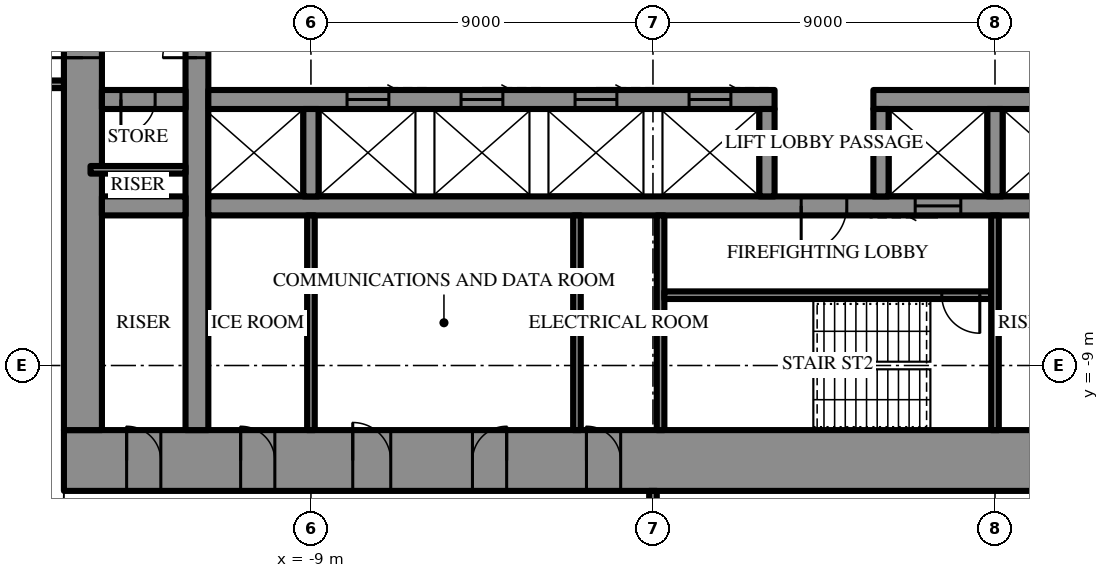
"""IFC4 building model, lengths in metres.
Left out: names, types, materials, properties, quantities, classifications, styles, units other than length and angle.
Written with IfcOpenShell. Run it as: python <this file> out.ifc"""

import sys

from ifc_helpers import new_model, si_unit, direction, frame, frame_2d, origin, place, context, subcontext, project, spatial, rectangle, extrude, element, fill, save


model = new_model("IFC4")
c1 = context("Model", 3, precision=1e-05, world=origin(), true_north=direction((0.0, 1.0)))
c2 = subcontext(c1, "Body", "Model", "MODEL_VIEW")
j1 = project(units=[si_unit("LENGTHUNIT", "METRE"), si_unit("PLANEANGLEUNIT", "RADIAN")], contexts=[c1])
p1 = place(None, origin())
s1 = spatial("IfcSite", under=j1, at=p1, CompositionType="ELEMENT")
p2 = place(p1, origin())
s2 = spatial("IfcBuilding", under=s1, at=p2, CompositionType="ELEMENT")
p3 = place(p2, frame((0.0, 0.0, 270.1)))
s3 = spatial("IfcBuildingStorey", under=s2, at=p3, CompositionType="ELEMENT", Elevation=270.1)
p4 = place(p3, frame((15.5, -11.5, 0.0), z_axis=(0.0, 0.0, 1.0), x_axis=(-1.0, 0.0, 0.0)))
e1 = element("IfcWall", 1, at=p4, inside=s3, PredefinedType="SHEAR", context=c2, shape_type="SweptSolid", body=[
    extrude(rectangle(XDim=31.0, YDim=1.6, at=frame_2d((15.5, 0.0))), origin(), (0.0, 0.0, 1.0), 4.2),
])
p5 = place(p4, frame((16.35, 0.0, 0.0)))
e2 = element("IfcOpeningElement", 2, at=p5, cuts=e1, PredefinedType="OPENING", context=c2, shape_type="SweptSolid", body=[
    extrude(rectangle(XDim=0.9, YDim=2.2, at=frame_2d((0.45, 1.1))), frame((0.0, 0.81, 0.0), z_axis=(0.0, -1.0, 0.0), x_axis=(1.0, 0.0, 0.0)), (0.0, 0.0, 1.0), 1.62),
])
p6 = place(p4, frame((19.35, 0.0, 0.0)))
e3 = element("IfcOpeningElement", 3, at=p6, cuts=e1, PredefinedType="OPENING", context=c2, shape_type="SweptSolid", body=[
    extrude(rectangle(XDim=0.9, YDim=2.2, at=frame_2d((0.45, 1.1))), frame((0.0, 0.81, 0.0), z_axis=(0.0, -1.0, 0.0), x_axis=(1.0, 0.0, 0.0)), (0.0, 0.0, 1.0), 1.62),
])
p7 = place(p4, frame((22.4, 0.0, 0.0)))
e4 = element("IfcOpeningElement", 4, at=p7, cuts=e1, PredefinedType="OPENING", context=c2, shape_type="SweptSolid", body=[
    extrude(rectangle(XDim=1.0, YDim=2.2, at=frame_2d((0.5, 1.1))), frame((0.0, 0.81, 0.0), z_axis=(0.0, -1.0, 0.0), x_axis=(1.0, 0.0, 0.0)), (0.0, 0.0, 1.0), 1.62),
])
p8 = place(p4, frame((1.65, 0.0, 0.0)))
e5 = element("IfcOpeningElement", 5, at=p8, cuts=e1, PredefinedType="OPENING", context=c2, shape_type="SweptSolid", body=[
    extrude(rectangle(XDim=0.9, YDim=2.2, at=frame_2d((0.45, 1.1))), frame((0.0, 0.81, 0.0), z_axis=(0.0, -1.0, 0.0), x_axis=(1.0, 0.0, 0.0)), (0.0, 0.0, 1.0), 1.62),
])
p9 = place(p4, frame((4.65, 0.0, 0.0)))
e6 = element("IfcOpeningElement", 6, at=p9, cuts=e1, PredefinedType="OPENING", context=c2, shape_type="SweptSolid", body=[
    extrude(rectangle(XDim=0.9, YDim=2.2, at=frame_2d((0.45, 1.1))), frame((0.0, 0.81, 0.0), z_axis=(0.0, -1.0, 0.0), x_axis=(1.0, 0.0, 0.0)), (0.0, 0.0, 1.0), 1.62),
])
p10 = place(p4, frame((25.45, 0.0, 0.0)))
e7 = element("IfcOpeningElement", 7, at=p10, cuts=e1, PredefinedType="OPENING", context=c2, shape_type="SweptSolid", body=[
    extrude(rectangle(XDim=0.9, YDim=2.2, at=frame_2d((0.45, 1.1))), frame((0.0, 0.81, 0.0), z_axis=(0.0, -1.0, 0.0), x_axis=(1.0, 0.0, 0.0)), (0.0, 0.0, 1.0), 1.62),
])
p11 = place(p4, frame((28.45, 0.0, 0.0)))
e8 = element("IfcOpeningElement", 8, at=p11, cuts=e1, PredefinedType="OPENING", context=c2, shape_type="SweptSolid", body=[
    extrude(rectangle(XDim=0.9, YDim=2.2, at=frame_2d((0.45, 1.1))), frame((0.0, 0.81, 0.0), z_axis=(0.0, -1.0, 0.0), x_axis=(1.0, 0.0, 0.0)), (0.0, 0.0, 1.0), 1.62),
])
p12 = place(p3, frame((-15.0, 10.7, 0.0), z_axis=(0.0, 0.0, 1.0), x_axis=(0.0, -1.0, 0.0)))
e9 = element("IfcWall", 9, at=p12, inside=s3, PredefinedType="SHEAR", context=c2, shape_type="SweptSolid", body=[
    extrude(rectangle(XDim=21.4, YDim=1.0, at=frame_2d((10.7, 0.0))), origin(), (0.0, 0.0, 1.0), 4.2),
])
p13 = place(p12, frame((9.8, 0.0, 0.0)))
e10 = element("IfcOpeningElement", 10, at=p13, cuts=e9, PredefinedType="OPENING", context=c2, shape_type="SweptSolid", body=[
    extrude(rectangle(XDim=1.8, YDim=2.4, at=frame_2d((0.9, 1.2))), frame((0.0, 0.51, 0.0), z_axis=(0.0, -1.0, 0.0), x_axis=(1.0, 0.0, 0.0)), (0.0, 0.0, 1.0), 1.02),
])
p14 = place(p3, frame((-12.0, -10.7, 0.0), z_axis=(0.0, 0.0, 1.0), x_axis=(0.0, 1.0, 0.0)))
e11 = element("IfcWall", 11, at=p14, inside=s3, PredefinedType="SHEAR", context=c2, shape_type="SweptSolid", body=[
    extrude(rectangle(XDim=21.4, YDim=0.6, at=frame_2d((10.7, 0.0))), origin(), (0.0, 0.0, 1.0), 4.2),
])
p15 = place(p14, frame((9.8, 0.0, 0.0)))
e12 = element("IfcOpeningElement", 12, at=p15, cuts=e11, PredefinedType="OPENING", context=c2, shape_type="SweptSolid", body=[
    extrude(rectangle(XDim=1.8, YDim=2.4, at=frame_2d((0.9, 1.2))), frame((0.0, 0.31, 0.0), z_axis=(0.0, -1.0, 0.0), x_axis=(1.0, 0.0, 0.0)), (0.0, 0.0, 1.0), 0.62),
])
p16 = place(p3, frame((11.7, -2.0, 0.0), z_axis=(0.0, 0.0, 1.0), x_axis=(-1.0, 0.0, 0.0)))
e13 = element("IfcWall", 13, at=p16, inside=s3, PredefinedType="SHEAR", context=c2, shape_type="SweptSolid", body=[
    extrude(rectangle(XDim=5.9, YDim=0.5, at=frame_2d((2.95, 0.0))), origin(), (0.0, 0.0, 1.0), 4.2),
])
p17 = place(p3, frame((3.2, -2.0, 0.0), z_axis=(0.0, 0.0, 1.0), x_axis=(-1.0, 0.0, 0.0)))
e14 = element("IfcWall", 14, at=p17, inside=s3, PredefinedType="SHEAR", context=c2, shape_type="SweptSolid", body=[
    extrude(rectangle(XDim=14.9, YDim=0.5, at=frame_2d((7.45, 0.0))), origin(), (0.0, 0.0, 1.0), 4.2),
])
p18 = place(p17, frame((1.15, 0.0, 0.0)))
e15 = element("IfcOpeningElement", 15, at=p18, cuts=e14, PredefinedType="OPENING", context=c2, shape_type="SweptSolid", body=[
    extrude(rectangle(XDim=1.1, YDim=2.2, at=frame_2d((0.55, 1.1))), frame((0.0, 0.26, 0.0), z_axis=(0.0, -1.0, 0.0), x_axis=(1.0, 0.0, 0.0)), (0.0, 0.0, 1.0), 0.52),
])
p19 = place(p17, frame((4.15, 0.0, 0.0)))
e16 = element("IfcOpeningElement", 16, at=p19, cuts=e14, PredefinedType="OPENING", context=c2, shape_type="SweptSolid", body=[
    extrude(rectangle(XDim=1.1, YDim=2.2, at=frame_2d((0.55, 1.1))), frame((0.0, 0.26, 0.0), z_axis=(0.0, -1.0, 0.0), x_axis=(1.0, 0.0, 0.0)), (0.0, 0.0, 1.0), 0.52),
])
p20 = place(p17, frame((7.15, 0.0, 0.0)))
e17 = element("IfcOpeningElement", 17, at=p20, cuts=e14, PredefinedType="OPENING", context=c2, shape_type="SweptSolid", body=[
    extrude(rectangle(XDim=1.1, YDim=2.2, at=frame_2d((0.55, 1.1))), frame((0.0, 0.26, 0.0), z_axis=(0.0, -1.0, 0.0), x_axis=(1.0, 0.0, 0.0)), (0.0, 0.0, 1.0), 0.52),
])
p21 = place(p17, frame((10.15, 0.0, 0.0)))
e18 = element("IfcOpeningElement", 18, at=p21, cuts=e14, PredefinedType="OPENING", context=c2, shape_type="SweptSolid", body=[
    extrude(rectangle(XDim=1.1, YDim=2.2, at=frame_2d((0.55, 1.1))), frame((0.0, 0.26, 0.0), z_axis=(0.0, -1.0, 0.0), x_axis=(1.0, 0.0, 0.0)), (0.0, 0.0, 1.0), 0.52),
])
p22 = place(p3, frame((-12.3, -2.0, 0.0), z_axis=(0.0, 0.0, 1.0), x_axis=(-1.0, 0.0, 0.0)))
e19 = element("IfcWall", 19, at=p22, inside=s3, PredefinedType="SHEAR", context=c2, shape_type="SweptSolid", body=[
    extrude(rectangle(XDim=2.2, YDim=0.5, at=frame_2d((1.1, 0.0))), origin(), (0.0, 0.0, 1.0), 4.2),
])
p23 = place(p22, frame((0.8, 0.0, 0.0)))
e20 = element("IfcOpeningElement", 20, at=p23, cuts=e19, PredefinedType="OPENING", context=c2, shape_type="SweptSolid", body=[
    extrude(rectangle(XDim=0.9, YDim=2.2, at=frame_2d((0.45, 1.1))), frame((0.0, 0.26, 0.0), z_axis=(0.0, -1.0, 0.0), x_axis=(1.0, 0.0, 0.0)), (0.0, 0.0, 1.0), 0.52),
])
p24 = place(p3, frame((11.7, -4.8, 0.0), z_axis=(0.0, 0.0, 1.0), x_axis=(-1.0, 0.0, 0.0)))
e21 = element("IfcWall", 21, at=p24, inside=s3, PredefinedType="SHEAR", context=c2, shape_type="SweptSolid", body=[
    extrude(rectangle(XDim=23.4, YDim=0.5, at=frame_2d((11.7, 0.0))), origin(), (0.0, 0.0, 1.0), 4.2),
])
p25 = place(p24, frame((6.6, 0.0, 0.0)))
e22 = element("IfcOpeningElement", 22, at=p25, cuts=e21, PredefinedType="OPENING", context=c2, shape_type="SweptSolid", body=[
    extrude(rectangle(XDim=1.2, YDim=2.2, at=frame_2d((0.6, 1.1))), frame((0.0, 0.26, 0.0), z_axis=(0.0, -1.0, 0.0), x_axis=(1.0, 0.0, 0.0)), (0.0, 0.0, 1.0), 0.52),
])
p26 = place(p24, frame((3.6, 0.0, 0.0)))
e23 = element("IfcOpeningElement", 23, at=p26, cuts=e21, PredefinedType="OPENING", context=c2, shape_type="SweptSolid", body=[
    extrude(rectangle(XDim=1.2, YDim=2.2, at=frame_2d((0.6, 1.1))), frame((0.0, 0.26, 0.0), z_axis=(0.0, -1.0, 0.0), x_axis=(1.0, 0.0, 0.0)), (0.0, 0.0, 1.0), 0.52),
])
p27 = place(p3, frame((-12.3, -4.8, 0.0), z_axis=(0.0, 0.0, 1.0), x_axis=(-1.0, 0.0, 0.0)))
e24 = element("IfcWall", 24, at=p27, inside=s3, PredefinedType="SHEAR", context=c2, shape_type="SweptSolid", body=[
    extrude(rectangle(XDim=2.2, YDim=0.5, at=frame_2d((1.1, 0.0))), origin(), (0.0, 0.0, 1.0), 4.2),
])
for number, where, z_axis, x_axis in (
    (25, (9.0, -2.25, 0.0), (0.0, 0.0, 1.0), (0.0, -1.0, 0.0)),
    (26, (6.0, -2.25, 0.0), (0.0, 0.0, 1.0), (0.0, -1.0, 0.0)),
    (27, (3.0, -2.25, 0.0), (0.0, 0.0, 1.0), (0.0, -1.0, 0.0)),
    (28, (-9.0, -2.25, 0.0), (0.0, 0.0, 1.0), (0.0, -1.0, 0.0)),
):
    element("IfcWall", number, at=place(p3, frame(where, z_axis=z_axis, x_axis=x_axis)), inside=s3, PredefinedType="SHEAR", context=c2, shape_type="SweptSolid", body=[
        extrude(rectangle(XDim=2.3, YDim=0.4, at=frame_2d((1.15, 0.0))), origin(), (0.0, 0.0, 1.0), 4.2),
    ])
p28 = place(p3, frame((0.2, -5.05, 0.0), z_axis=(0.0, 0.0, 1.0), x_axis=(0.0, -1.0, 0.0)))
e29 = element("IfcWall", 29, at=p28, inside=s3, PredefinedType="SHEAR", context=c2, shape_type="SweptSolid", body=[
    extrude(rectangle(XDim=5.65, YDim=0.2, at=frame_2d((2.825, 0.0))), origin(), (0.0, 0.0, 1.0), 4.2),
])
p29 = place(p3, frame((8.9, -7.15, 0.0), z_axis=(0.0, 0.0, 1.0), x_axis=(-1.0, 0.0, 0.0)))
e30 = element("IfcWall", 30, at=p29, inside=s3, PredefinedType="SHEAR", context=c2, shape_type="SweptSolid", body=[
    extrude(rectangle(XDim=8.6, YDim=0.2, at=frame_2d((4.3, 0.0))), origin(), (0.0, 0.0, 1.0), 4.2),
])
p30 = place(p29, frame((0.3, 0.0, 0.0)))
e31 = element("IfcOpeningElement", 31, at=p30, cuts=e30, PredefinedType="OPENING", context=c2, shape_type="SweptSolid", body=[
    extrude(rectangle(XDim=1.0, YDim=2.2, at=frame_2d((0.5, 1.1))), frame((0.0, 0.11, 0.0), z_axis=(0.0, -1.0, 0.0), x_axis=(1.0, 0.0, 0.0)), (0.0, 0.0, 1.0), 0.22),
])
for number, where, z_axis, x_axis in (
    (32, (9.0, -5.05, 0.0), (0.0, 0.0, 1.0), (0.0, -1.0, 0.0)),
    (33, (-9.0, -5.05, 0.0), (0.0, 0.0, 1.0), (0.0, -1.0, 0.0)),
    (34, (-2.0, -5.05, 0.0), (0.0, 0.0, 1.0), (0.0, -1.0, 0.0)),
):
    element("IfcWall", number, at=place(p3, frame(where, z_axis=z_axis, x_axis=x_axis)), inside=s3, PredefinedType="PARTITIONING", context=c2, shape_type="SweptSolid", body=[
        extrude(rectangle(XDim=5.65, YDim=0.2, at=frame_2d((2.825, 0.0))), origin(), (0.0, 0.0, 1.0), 4.0),
    ])
p31 = place(p3, frame((-12.3, -3.85, 0.0), z_axis=(0.0, 0.0, 1.0), x_axis=(-1.0, 0.0, 0.0)))
e35 = element("IfcWall", 35, at=p31, inside=s3, PredefinedType="PARTITIONING", context=c2, shape_type="SweptSolid", body=[
    extrude(rectangle(XDim=2.5, YDim=0.2, at=frame_2d((1.25, 0.0))), origin(), (0.0, 0.0, 1.0), 4.0),
])
p32 = place(p3, frame((-15.5, -1.6, 0.0), z_axis=(0.0, 0.0, 1.0), x_axis=(-1.0, 0.0, 0.0)))
e36 = element("IfcWall", 36, at=p32, inside=s3, PredefinedType="PARTITIONING", context=c2, shape_type="SweptSolid", body=[
    extrude(rectangle(XDim=12.2, YDim=0.2, at=frame_2d((6.1, 0.0))), origin(), (0.0, 0.0, 1.0), 4.0),
])
p33 = place(p32, frame((8.04, 0.0, 0.0)))
e37 = element("IfcOpeningElement", 37, at=p33, cuts=e36, PredefinedType="OPENING", context=c2, shape_type="SweptSolid", body=[
    extrude(rectangle(XDim=1.0, YDim=2.2, at=frame_2d((0.5, 1.1))), frame((0.0, 0.11, 0.0), z_axis=(0.0, -1.0, 0.0), x_axis=(1.0, 0.0, 0.0)), (0.0, 0.0, 1.0), 0.22),
])
p34 = place(p3, frame((0.0, -12.3, 0.0), z_axis=(0.0, 0.0, 1.0), x_axis=(0.0, -1.0, 0.0)))
e38 = element("IfcWall", 38, at=p34, inside=s3, PredefinedType="PARTITIONING", context=c2, shape_type="SweptSolid", body=[
    extrude(rectangle(XDim=15.55, YDim=0.2, at=frame_2d((7.775, 0.0))), origin(), (0.0, 0.0, 1.0), 2.992),
])
p35 = place(p34, frame((1.055, 0.0, 0.0)))
e39 = element("IfcOpeningElement", 39, at=p35, cuts=e38, PredefinedType="OPENING", context=c2, shape_type="SweptSolid", body=[
    extrude(rectangle(XDim=1.0, YDim=2.2, at=frame_2d((0.5, 1.1))), frame((0.0, 0.11, 0.0), z_axis=(0.0, -1.0, 0.0), x_axis=(1.0, 0.0, 0.0)), (0.0, 0.0, 1.0), 0.22),
])
p36 = place(p13, frame((1.8, 0.0, 0.0), z_axis=(0.0, 0.0, 1.0), x_axis=(-1.0, 0.0, 0.0)))
e40 = element("IfcDoor", 40, at=p36, inside=s3, OperationType="DOUBLE_DOOR_SINGLE_SWING", PredefinedType="DOOR", context=c2, shape_type="SweptSolid", body=[
    extrude(rectangle(XDim=1.8, YDim=2.4, at=frame_2d((0.9, 1.2))), frame((0.0, 0.025, 0.0), z_axis=(0.0, -1.0, 0.0), x_axis=(1.0, 0.0, 0.0)), (0.0, 0.0, 1.0), 0.05),
])
fill(e10, e40)
p37 = place(p25, origin())
e41 = element("IfcDoor", 41, at=p37, inside=s3, OperationType="SINGLE_SWING_LEFT", PredefinedType="DOOR", context=c2, shape_type="SweptSolid", body=[
    extrude(rectangle(XDim=1.2, YDim=2.2, at=frame_2d((0.6, 1.1))), frame((0.0, 0.025, 0.0), z_axis=(0.0, -1.0, 0.0), x_axis=(1.0, 0.0, 0.0)), (0.0, 0.0, 1.0), 0.05),
])
fill(e22, e41)
p38 = place(p30, origin())
e42 = element("IfcDoor", 42, at=p38, inside=s3, OperationType="SINGLE_SWING_RIGHT", PredefinedType="DOOR", context=c2, shape_type="SweptSolid", body=[
    extrude(rectangle(XDim=1.0, YDim=2.2, at=frame_2d((0.5, 1.1))), frame((0.0, 0.025, 0.0), z_axis=(0.0, -1.0, 0.0), x_axis=(1.0, 0.0, 0.0)), (0.0, 0.0, 1.0), 0.05),
])
fill(e31, e42)
p39 = place(p5, frame((0.9, 0.0, 0.0), z_axis=(0.0, 0.0, 1.0), x_axis=(-1.0, 0.0, 0.0)))
e43 = element("IfcDoor", 43, at=p39, inside=s3, OperationType="SINGLE_SWING_RIGHT", PredefinedType="DOOR", context=c2, shape_type="SweptSolid", body=[
    extrude(rectangle(XDim=0.9, YDim=2.2, at=frame_2d((0.45, 1.1))), frame((0.0, 0.025, 0.0), z_axis=(0.0, -1.0, 0.0), x_axis=(1.0, 0.0, 0.0)), (0.0, 0.0, 1.0), 0.05),
])
fill(e2, e43)
p40 = place(p6, frame((0.9, 0.0, 0.0), z_axis=(0.0, 0.0, 1.0), x_axis=(-1.0, 0.0, 0.0)))
e44 = element("IfcDoor", 44, at=p40, inside=s3, OperationType="SINGLE_SWING_LEFT", PredefinedType="DOOR", context=c2, shape_type="SweptSolid", body=[
    extrude(rectangle(XDim=0.9, YDim=2.2, at=frame_2d((0.45, 1.1))), frame((0.0, 0.025, 0.0), z_axis=(0.0, -1.0, 0.0), x_axis=(1.0, 0.0, 0.0)), (0.0, 0.0, 1.0), 0.05),
])
fill(e3, e44)
p41 = place(p7, frame((1.0, 0.0, 0.0), z_axis=(0.0, 0.0, 1.0), x_axis=(-1.0, 0.0, 0.0)))
e45 = element("IfcDoor", 45, at=p41, inside=s3, OperationType="SINGLE_SWING_RIGHT", PredefinedType="DOOR", context=c2, shape_type="SweptSolid", body=[
    extrude(rectangle(XDim=1.0, YDim=2.2, at=frame_2d((0.5, 1.1))), frame((0.0, 0.025, 0.0), z_axis=(0.0, -1.0, 0.0), x_axis=(1.0, 0.0, 0.0)), (0.0, 0.0, 1.0), 0.05),
])
fill(e4, e45)
p42 = place(p10, frame((0.9, 0.0, 0.0), z_axis=(0.0, 0.0, 1.0), x_axis=(-1.0, 0.0, 0.0)))
e46 = element("IfcDoor", 46, at=p42, inside=s3, OperationType="SINGLE_SWING_RIGHT", PredefinedType="DOOR", context=c2, shape_type="SweptSolid", body=[
    extrude(rectangle(XDim=0.9, YDim=2.2, at=frame_2d((0.45, 1.1))), frame((0.0, 0.025, 0.0), z_axis=(0.0, -1.0, 0.0), x_axis=(1.0, 0.0, 0.0)), (0.0, 0.0, 1.0), 0.05),
])
fill(e7, e46)
p43 = place(p11, frame((0.9, 0.0, 0.0), z_axis=(0.0, 0.0, 1.0), x_axis=(-1.0, 0.0, 0.0)))
e47 = element("IfcDoor", 47, at=p43, inside=s3, OperationType="SINGLE_SWING_RIGHT", PredefinedType="DOOR", context=c2, shape_type="SweptSolid", body=[
    extrude(rectangle(XDim=0.9, YDim=2.2, at=frame_2d((0.45, 1.1))), frame((0.0, 0.025, 0.0), z_axis=(0.0, -1.0, 0.0), x_axis=(1.0, 0.0, 0.0)), (0.0, 0.0, 1.0), 0.05),
])
fill(e8, e47)
p44 = place(p23, origin())
e48 = element("IfcDoor", 48, at=p44, inside=s3, OperationType="SINGLE_SWING_LEFT", PredefinedType="DOOR", context=c2, shape_type="SweptSolid", body=[
    extrude(rectangle(XDim=0.9, YDim=2.2, at=frame_2d((0.45, 1.1))), frame((0.0, 0.025, 0.0), z_axis=(0.0, -1.0, 0.0), x_axis=(1.0, 0.0, 0.0)), (0.0, 0.0, 1.0), 0.05),
])
fill(e20, e48)
p45 = place(p15, origin())
e49 = element("IfcDoor", 49, at=p45, inside=s3, OperationType="DOUBLE_DOOR_SINGLE_SWING", PredefinedType="DOOR", context=c2, shape_type="SweptSolid", body=[
    extrude(rectangle(XDim=1.8, YDim=2.4, at=frame_2d((0.9, 1.2))), frame((0.0, 0.025, 0.0), z_axis=(0.0, -1.0, 0.0), x_axis=(1.0, 0.0, 0.0)), (0.0, 0.0, 1.0), 0.05),
])
fill(e12, e49)
p46 = place(p26, origin())
e50 = element("IfcDoor", 50, at=p46, inside=s3, OperationType="SLIDING_TO_LEFT", PredefinedType="DOOR", context=c2, shape_type="SweptSolid", body=[
    extrude(rectangle(XDim=1.2, YDim=2.2, at=frame_2d((0.6, 1.1))), frame((0.0, 0.025, 0.0), z_axis=(0.0, -1.0, 0.0), x_axis=(1.0, 0.0, 0.0)), (0.0, 0.0, 1.0), 0.05),
])
fill(e23, e50)
p47 = place(p18, frame((1.1, 0.0, 0.0), z_axis=(0.0, 0.0, 1.0), x_axis=(-1.0, 0.0, 0.0)))
e51 = element("IfcDoor", 51, at=p47, inside=s3, OperationType="SLIDING_TO_LEFT", PredefinedType="DOOR", context=c2, shape_type="SweptSolid", body=[
    extrude(rectangle(XDim=1.1, YDim=2.2, at=frame_2d((0.55, 1.1))), frame((0.0, 0.025, 0.0), z_axis=(0.0, -1.0, 0.0), x_axis=(1.0, 0.0, 0.0)), (0.0, 0.0, 1.0), 0.05),
])
fill(e15, e51)
p48 = place(p19, frame((1.1, 0.0, 0.0), z_axis=(0.0, 0.0, 1.0), x_axis=(-1.0, 0.0, 0.0)))
e52 = element("IfcDoor", 52, at=p48, inside=s3, OperationType="SLIDING_TO_LEFT", PredefinedType="DOOR", context=c2, shape_type="SweptSolid", body=[
    extrude(rectangle(XDim=1.1, YDim=2.2, at=frame_2d((0.55, 1.1))), frame((0.0, 0.025, 0.0), z_axis=(0.0, -1.0, 0.0), x_axis=(1.0, 0.0, 0.0)), (0.0, 0.0, 1.0), 0.05),
])
fill(e16, e52)
p49 = place(p20, frame((1.1, 0.0, 0.0), z_axis=(0.0, 0.0, 1.0), x_axis=(-1.0, 0.0, 0.0)))
e53 = element("IfcDoor", 53, at=p49, inside=s3, OperationType="SLIDING_TO_LEFT", PredefinedType="DOOR", context=c2, shape_type="SweptSolid", body=[
    extrude(rectangle(XDim=1.1, YDim=2.2, at=frame_2d((0.55, 1.1))), frame((0.0, 0.025, 0.0), z_axis=(0.0, -1.0, 0.0), x_axis=(1.0, 0.0, 0.0)), (0.0, 0.0, 1.0), 0.05),
])
fill(e17, e53)
p50 = place(p21, frame((1.1, 0.0, 0.0), z_axis=(0.0, 0.0, 1.0), x_axis=(-1.0, 0.0, 0.0)))
e54 = element("IfcDoor", 54, at=p50, inside=s3, OperationType="SLIDING_TO_LEFT", PredefinedType="DOOR", context=c2, shape_type="SweptSolid", body=[
    extrude(rectangle(XDim=1.1, YDim=2.2, at=frame_2d((0.55, 1.1))), frame((0.0, 0.025, 0.0), z_axis=(0.0, -1.0, 0.0), x_axis=(1.0, 0.0, 0.0)), (0.0, 0.0, 1.0), 0.05),
])
fill(e18, e54)
save(model, sys.argv[1])
